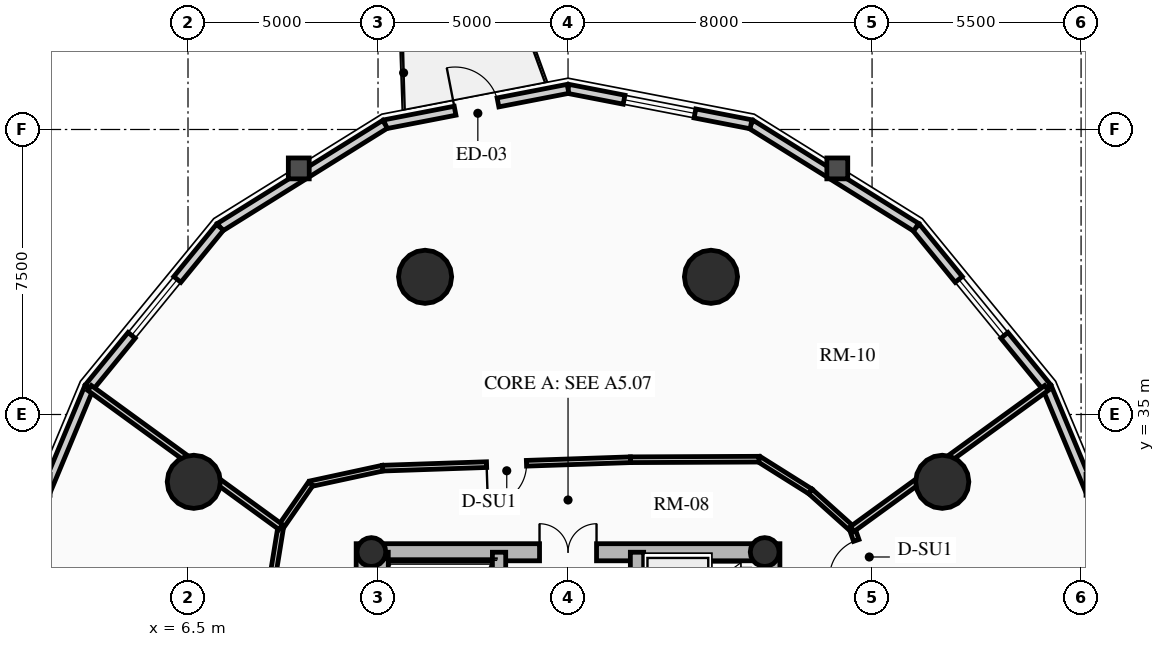
"""IFC4 building model, lengths in metres.
Left out: names, types, materials, properties, quantities, classifications, styles, units other than length and angle.
Written with IfcOpenShell. Run it as: python <this file> out.ifc"""

import sys

from ifc_helpers import new_model, si_unit, direction, frame, frame_2d, origin, origin_2d, place, context, subcontext, project, spatial, rectangle, circle, hollow_circle, extrude, source, transform, mapped, element, fill, save


model = new_model("IFC4")
c1 = context("Model", 3, precision=1e-05, world=origin(), true_north=direction((0.0, 1.0)))
c2 = subcontext(c1, "Body", "Model", "MODEL_VIEW")
j1 = project(units=[si_unit("LENGTHUNIT", "METRE"), si_unit("PLANEANGLEUNIT", "RADIAN")], contexts=[c1])
p1 = place(None, origin())
s1 = spatial("IfcSite", under=j1, at=p1, CompositionType="ELEMENT")
p2 = place(p1, origin())
s2 = spatial("IfcBuilding", under=s1, at=p2, CompositionType="ELEMENT")
p3 = place(p2, frame((0.0, 0.0, 122.53)))
s3 = spatial("IfcBuildingStorey", under=s2, at=p3, CompositionType="ELEMENT", Elevation=122.53)
for number, where, z_axis, x_axis in (
    (1, (11.15, 17.4, 0.0), (0.0, 0.0, 1.0), (0.0, 1.0, 0.0)),
    (2, (21.85, 17.4, 0.0), (0.0, 0.0, 1.0), (0.0, 1.0, 0.0)),
):
    element("IfcWall", number, at=place(p3, frame(where, z_axis=z_axis, x_axis=x_axis)), inside=s3, PredefinedType="SHEAR", context=c2, shape_type="SweptSolid", body=[
        extrude(rectangle(XDim=14.2, YDim=0.45, at=frame_2d((7.1, 0.0))), origin(), (0.0, 0.0, 1.0), 2.91),
    ])
p4 = place(p3, frame((11.15, 31.375, 0.0), z_axis=(0.0, 0.0, 1.0), x_axis=(1.0, 0.0, 0.0)))
e3 = element("IfcWall", 3, at=p4, inside=s3, PredefinedType="SHEAR", context=c2, shape_type="SweptSolid", body=[
    extrude(rectangle(XDim=10.7, YDim=0.45, at=frame_2d((5.35, 0.0))), origin(), (0.0, 0.0, 1.0), 2.91),
])
m1 = source(origin(), c2, "Body", "SweptSolid", [
    extrude(rectangle(XDim=1.5, YDim=2.02, at=frame_2d((0.75, 1.01))), frame((0.0, 0.235, 0.0), z_axis=(0.0, -1.0, 0.0), x_axis=(1.0, 0.0, 0.0)), (0.0, 0.0, 1.0), 0.47),
])
p5 = place(p4, frame((4.6, 0.0, 0.0)))
e4 = element("IfcOpeningElement", 4, at=p5, cuts=e3, PredefinedType="OPENING", context=c2, shape_type="MappedRepresentation", body=[
    mapped(m1, transform((0.0, 0.0, 0.0), x_axis=(1.0, 0.0, 0.0), y_axis=(0.0, 1.0, 0.0), z_axis=(0.0, 0.0, 1.0), scale=1.0)),
])
p6 = place(p3, frame((14.685, 17.625, 0.0), z_axis=(0.0, 0.0, 1.0), x_axis=(0.0, 1.0, 0.0)))
e5 = element("IfcWall", 5, at=p6, inside=s3, PredefinedType="SHEAR", context=c2, shape_type="SweptSolid", body=[
    extrude(rectangle(XDim=13.75, YDim=0.35, at=frame_2d((6.875, 0.0))), origin(), (0.0, 0.0, 1.0), 2.91),
])
m2 = source(origin(), c2, "Body", "SweptSolid", [
    extrude(rectangle(XDim=1.1, YDim=2.015, at=frame_2d((0.55, 1.007))), frame((0.0, 0.185, 0.0), z_axis=(0.0, -1.0, 0.0), x_axis=(1.0, 0.0, 0.0)), (0.0, 0.0, 1.0), 0.37),
])
p7 = place(p6, frame((4.875, 0.0, 0.0)))
e6 = element("IfcOpeningElement", 6, at=p7, cuts=e5, PredefinedType="OPENING", context=c2, shape_type="MappedRepresentation", body=[
    mapped(m2, transform((0.0, 0.0, 0.0), x_axis=(1.0, 0.0, 0.0), y_axis=(0.0, 1.0, 0.0), z_axis=(0.0, 0.0, 1.0), scale=1.0)),
])
m3 = source(origin(), c2, "Body", "SweptSolid", [
    extrude(rectangle(XDim=1.15, YDim=2.02, at=frame_2d((0.575, 1.01))), frame((0.0, 0.185, 0.0), z_axis=(0.0, -1.0, 0.0), x_axis=(1.0, 0.0, 0.0)), (0.0, 0.0, 1.0), 0.37),
])
p8 = place(p6, frame((7.295, 0.0, 0.0)))
e7 = element("IfcOpeningElement", 7, at=p8, cuts=e5, PredefinedType="OPENING", context=c2, shape_type="MappedRepresentation", body=[
    mapped(m3, transform((0.0, 0.0, 0.0), x_axis=(1.0, 0.0, 0.0), y_axis=(0.0, 1.0, 0.0), z_axis=(0.0, 0.0, 1.0), scale=1.0)),
])
p9 = place(p3, frame((18.315, 17.625, 0.0), z_axis=(0.0, 0.0, 1.0), x_axis=(0.0, 1.0, 0.0)))
e8 = element("IfcWall", 8, at=p9, inside=s3, PredefinedType="SHEAR", context=c2, shape_type="SweptSolid", body=[
    extrude(rectangle(XDim=13.75, YDim=0.35, at=frame_2d((6.875, 0.0))), origin(), (0.0, 0.0, 1.0), 2.91),
])
p10 = place(p9, frame((10.0, 0.0, 0.0)))
e9 = element("IfcOpeningElement", 9, at=p10, cuts=e8, PredefinedType="OPENING", context=c2, shape_type="MappedRepresentation", body=[
    mapped(m2, transform((0.0, 0.0, 0.0), x_axis=(1.0, 0.0, 0.0), y_axis=(0.0, 1.0, 0.0), z_axis=(0.0, 0.0, 1.0), scale=1.0)),
])
p11 = place(p9, frame((12.0, 0.0, 0.0)))
e10 = element("IfcOpeningElement", 10, at=p11, cuts=e8, PredefinedType="OPENING", context=c2, shape_type="MappedRepresentation", body=[
    mapped(m2, transform((0.0, 0.0, 0.0), x_axis=(1.0, 0.0, 0.0), y_axis=(0.0, 1.0, 0.0), z_axis=(0.0, 0.0, 1.0), scale=1.0)),
])
p12 = place(p9, frame((5.305, 0.0, 0.0)))
e11 = element("IfcOpeningElement", 11, at=p12, cuts=e8, PredefinedType="OPENING", context=c2, shape_type="MappedRepresentation", body=[
    mapped(m3, transform((0.0, 0.0, 0.0), x_axis=(1.0, 0.0, 0.0), y_axis=(0.0, 1.0, 0.0), z_axis=(0.0, 0.0, 1.0), scale=1.0)),
])
p13 = place(p3, frame((11.595, 24.655, 0.0), z_axis=(0.0, 0.0, 1.0), x_axis=(0.0, 1.0, 0.0)))
e12 = element("IfcWall", 12, at=p13, inside=s3, PredefinedType="SHEAR", context=c2, shape_type="SweptSolid", body=[
    extrude(rectangle(XDim=6.72, YDim=0.35, at=frame_2d((3.36, 0.0))), origin(), (0.0, 0.0, 1.0), 2.91),
])
for number, where, z_axis, x_axis in (
    (13, (11.325, 31.38, 0.0), (0.0, 0.0, 1.0), (1.0, 0.0, 0.0)),
    (14, (21.675, 31.38, 0.0), (0.0, 0.0, 1.0), (1.0, 0.0, 0.0)),
):
    element("IfcColumn", number, at=place(p3, frame(where, z_axis=z_axis, x_axis=x_axis)), inside=s3, PredefinedType="COLUMN", context=c2, shape_type="SweptSolid", body=[
        extrude(hollow_circle(Radius=0.38, WallThickness=0.032, at=origin_2d()), origin(), (0.0, 0.0, 1.0), 2.91),
    ])
for number, where, z_axis, x_axis in (
    (15, (26.347, 33.229, 0.0), (0.0, 0.0, 1.0), (1.0, 0.0, 0.0)),
    (16, (20.261, 38.623, 0.0), (0.0, 0.0, 1.0), (1.0, 0.0, 0.0)),
    (17, (12.739, 38.623, 0.0), (0.0, 0.0, 1.0), (1.0, 0.0, 0.0)),
    (18, (6.653, 33.229, 0.0), (0.0, 0.0, 1.0), (1.0, 0.0, 0.0)),
):
    element("IfcColumn", number, at=place(p3, frame(where, z_axis=z_axis, x_axis=x_axis)), inside=s3, PredefinedType="USERDEFINED", context=c2, shape_type="SweptSolid", body=[
        extrude(circle(Radius=0.7, at=origin_2d()), origin(), (0.0, 0.0, 1.0), 2.91),
    ])
p14 = place(p3, frame((29.105, 35.709, 0.0), z_axis=(0.0, 0.0, 1.0), x_axis=(0.384344417632, -0.923189779317, 0.0)))
e19 = element("IfcWall", 19, at=p14, inside=s3, PredefinedType="SOLIDWALL", context=c2, shape_type="SweptSolid", body=[
    extrude(rectangle(XDim=5.758, YDim=0.24, at=frame_2d((2.879, 0.0))), origin(), (0.0, 0.0, 1.0), 2.139),
])
p15 = place(p3, frame((25.658, 39.928, 0.0), z_axis=(0.0, 0.0, 1.0), x_axis=(0.632700781152, -0.77439635945, 0.0)))
e20 = element("IfcWall", 20, at=p15, inside=s3, PredefinedType="SOLIDWALL", context=c2, shape_type="SweptSolid", body=[
    extrude(rectangle(XDim=5.448, YDim=0.24, at=frame_2d((2.724, 0.0))), origin(), (0.0, 0.0, 1.0), 2.139),
])
m4 = source(origin(), c2, "Body", "SweptSolid", [
    extrude(rectangle(XDim=1.9, YDim=1.35, at=frame_2d((0.95, 0.675))), frame((0.0, 0.13, 0.0), z_axis=(0.0, -1.0, 0.0), x_axis=(1.0, 0.0, 0.0)), (0.0, 0.0, 1.0), 0.26),
])
p16 = place(p15, frame((1.774, 0.0, 0.65)))
e21 = element("IfcOpeningElement", 21, at=p16, cuts=e20, PredefinedType="OPENING", context=c2, shape_type="MappedRepresentation", body=[
    mapped(m4, transform((0.0, 0.0, 0.0), x_axis=(1.0, 0.0, 0.0), y_axis=(0.0, 1.0, 0.0), z_axis=(0.0, 0.0, 1.0), scale=1.0)),
])
p17 = place(p3, frame((21.315, 42.637, 0.0), z_axis=(0.0, 0.0, 1.0), x_axis=(0.848520380187, -0.529162701263, 0.0)))
e22 = element("IfcWall", 22, at=p17, inside=s3, PredefinedType="SOLIDWALL", context=c2, shape_type="SweptSolid", body=[
    extrude(rectangle(XDim=5.119, YDim=0.24, at=frame_2d((2.56, 0.0))), origin(), (0.0, 0.0, 1.0), 2.139),
])
p18 = place(p3, frame((16.5, 43.57, 0.0), z_axis=(0.0, 0.0, 1.0), x_axis=(0.981723785992, -0.190311344954, 0.0)))
e23 = element("IfcWall", 23, at=p18, inside=s3, PredefinedType="SOLIDWALL", context=c2, shape_type="SweptSolid", body=[
    extrude(rectangle(XDim=4.904, YDim=0.24, at=frame_2d((2.452, 0.0))), origin(), (0.0, 0.0, 1.0), 2.139),
])
p19 = place(p18, frame((1.502, 0.0, 0.65)))
e24 = element("IfcOpeningElement", 24, at=p19, cuts=e23, PredefinedType="OPENING", context=c2, shape_type="MappedRepresentation", body=[
    mapped(m4, transform((0.0, 0.0, 0.0), x_axis=(1.0, 0.0, 0.0), y_axis=(0.0, 1.0, 0.0), z_axis=(0.0, 0.0, 1.0), scale=1.0)),
])
p20 = place(p3, frame((11.685, 42.637, 0.0), z_axis=(0.0, 0.0, 1.0), x_axis=(0.981723785992, 0.190311344954, 0.0)))
e25 = element("IfcWall", 25, at=p20, inside=s3, PredefinedType="SOLIDWALL", context=c2, shape_type="SweptSolid", body=[
    extrude(rectangle(XDim=4.904, YDim=0.24, at=frame_2d((2.452, 0.0))), origin(), (0.0, 0.0, 1.0), 2.139),
])
m5 = source(origin(), c2, "Body", "SweptSolid", [
    extrude(rectangle(XDim=1.15, YDim=2.005, at=frame_2d((0.575, 1.002))), frame((0.0, 0.13, 0.0), z_axis=(0.0, -1.0, 0.0), x_axis=(1.0, 0.0, 0.0)), (0.0, 0.0, 1.0), 0.26),
])
p21 = place(p20, frame((1.877, 0.0, 0.0)))
e26 = element("IfcOpeningElement", 26, at=p21, cuts=e25, PredefinedType="OPENING", context=c2, shape_type="MappedRepresentation", body=[
    mapped(m5, transform((0.0, 0.0, 0.0), x_axis=(1.0, 0.0, 0.0), y_axis=(0.0, 1.0, 0.0), z_axis=(0.0, 0.0, 1.0), scale=1.0)),
])
p22 = place(p3, frame((7.342, 39.928, 0.0), z_axis=(0.0, 0.0, 1.0), x_axis=(0.848520380187, 0.529162701263, 0.0)))
e27 = element("IfcWall", 27, at=p22, inside=s3, PredefinedType="SOLIDWALL", context=c2, shape_type="SweptSolid", body=[
    extrude(rectangle(XDim=5.119, YDim=0.24, at=frame_2d((2.56, 0.0))), origin(), (0.0, 0.0, 1.0), 2.139),
])
p23 = place(p3, frame((3.895, 35.709, 0.0), z_axis=(0.0, 0.0, 1.0), x_axis=(0.632700781152, 0.77439635945, 0.0)))
e28 = element("IfcWall", 28, at=p23, inside=s3, PredefinedType="SOLIDWALL", context=c2, shape_type="SweptSolid", body=[
    extrude(rectangle(XDim=5.448, YDim=0.24, at=frame_2d((2.724, 0.0))), origin(), (0.0, 0.0, 1.0), 2.139),
])
p24 = place(p23, frame((1.774, 0.0, 0.65)))
e29 = element("IfcOpeningElement", 29, at=p24, cuts=e28, PredefinedType="OPENING", context=c2, shape_type="MappedRepresentation", body=[
    mapped(m4, transform((0.0, 0.0, 0.0), x_axis=(1.0, 0.0, 0.0), y_axis=(0.0, 1.0, 0.0), z_axis=(0.0, 0.0, 1.0), scale=1.0)),
])
p25 = place(p3, frame((1.682, 30.393, 0.0), z_axis=(0.0, 0.0, 1.0), x_axis=(0.384344417632, 0.923189779317, 0.0)))
e30 = element("IfcWall", 30, at=p25, inside=s3, PredefinedType="SOLIDWALL", context=c2, shape_type="SweptSolid", body=[
    extrude(rectangle(XDim=5.758, YDim=0.24, at=frame_2d((2.879, 0.0))), origin(), (0.0, 0.0, 1.0), 2.139),
])
p26 = place(p3, frame((24.469, 30.582, 0.0), z_axis=(0.0, 0.0, 1.0), x_axis=(-0.328902536986, 0.944363871166, 0.0)))
e31 = element("IfcWall", 31, at=p26, inside=s3, PredefinedType="PARTITIONING", context=c2, shape_type="SweptSolid", body=[
    extrude(rectangle(XDim=1.488, YDim=0.15, at=frame_2d((0.744, 0.0))), origin(), (0.0, 0.0, 1.0), 2.185),
])
m6 = source(origin(), c2, "Body", "SweptSolid", [
    extrude(rectangle(XDim=1.05, YDim=2.015, at=frame_2d((0.525, 1.007))), frame((0.0, 0.085, 0.0), z_axis=(0.0, -1.0, 0.0), x_axis=(1.0, 0.0, 0.0)), (0.0, 0.0, 1.0), 0.17),
])
p27 = place(p26, frame((0.12, 0.0, 0.0)))
e32 = element("IfcOpeningElement", 32, at=p27, cuts=e31, PredefinedType="OPENING", context=c2, shape_type="MappedRepresentation", body=[
    mapped(m6, transform((0.0, 0.0, 0.0), x_axis=(1.0, 0.0, 0.0), y_axis=(0.0, 1.0, 0.0), z_axis=(0.0, 0.0, 1.0), scale=1.0)),
])
p28 = place(p3, frame((23.98, 31.987, 0.0), z_axis=(0.0, 0.0, 1.0), x_axis=(-0.744317922268, 0.667825449193, 0.0)))
e33 = element("IfcWall", 33, at=p28, inside=s3, PredefinedType="PARTITIONING", context=c2, shape_type="SweptSolid", body=[
    extrude(rectangle(XDim=1.481, YDim=0.15, at=frame_2d((0.74, 0.0))), origin(), (0.0, 0.0, 1.0), 2.185),
])
p29 = place(p3, frame((22.877, 32.976, 0.0), z_axis=(0.0, 0.0, 1.0), x_axis=(-0.846723232687, 0.532033614754, 0.0)))
e34 = element("IfcWall", 34, at=p29, inside=s3, PredefinedType="PARTITIONING", context=c2, shape_type="SweptSolid", body=[
    extrude(rectangle(XDim=1.595, YDim=0.15, at=frame_2d((0.797, 0.0))), origin(), (0.0, 0.0, 1.0), 2.185),
])
p30 = place(p3, frame((21.527, 33.824, 0.0), z_axis=(0.0, 0.0, 1.0), x_axis=(-0.999990631344, -0.00432865146, 0.0)))
e35 = element("IfcWall", 35, at=p30, inside=s3, PredefinedType="PARTITIONING", context=c2, shape_type="SweptSolid", body=[
    extrude(rectangle(XDim=3.384, YDim=0.15, at=frame_2d((1.692, 0.0))), origin(), (0.0, 0.0, 1.0), 2.185),
])
p31 = place(p3, frame((18.143, 33.81, 0.0), z_axis=(0.0, 0.0, 1.0), x_axis=(-0.999423023908, -0.033964971394, 0.0)))
e36 = element("IfcWall", 36, at=p31, inside=s3, PredefinedType="PARTITIONING", context=c2, shape_type="SweptSolid", body=[
    extrude(rectangle(XDim=6.527, YDim=0.15, at=frame_2d((3.263, 0.0))), origin(), (0.0, 0.0, 1.0), 2.185),
])
p32 = place(p31, frame((2.738, 0.0, 0.0)))
e37 = element("IfcOpeningElement", 37, at=p32, cuts=e36, PredefinedType="OPENING", context=c2, shape_type="MappedRepresentation", body=[
    mapped(m6, transform((0.0, 0.0, 0.0), x_axis=(1.0, 0.0, 0.0), y_axis=(0.0, 1.0, 0.0), z_axis=(0.0, 0.0, 1.0), scale=1.0)),
])
p33 = place(p3, frame((11.62, 33.588, 0.0), z_axis=(0.0, 0.0, 1.0), x_axis=(-0.977392314559, -0.211433827571, 0.0)))
e38 = element("IfcWall", 38, at=p33, inside=s3, PredefinedType="PARTITIONING", context=c2, shape_type="SweptSolid", body=[
    extrude(rectangle(XDim=1.934, YDim=0.15, at=frame_2d((0.967, 0.0))), origin(), (0.0, 0.0, 1.0), 2.185),
])
p34 = place(p3, frame((9.729, 33.179, 0.0), z_axis=(0.0, 0.0, 1.0), x_axis=(-0.569155068352, -0.822230203878, 0.0)))
e39 = element("IfcWall", 39, at=p34, inside=s3, PredefinedType="PARTITIONING", context=c2, shape_type="SweptSolid", body=[
    extrude(rectangle(XDim=1.387, YDim=0.15, at=frame_2d((0.694, 0.0))), origin(), (0.0, 0.0, 1.0), 2.185),
])
p35 = place(p3, frame((8.94, 32.038, 0.0), z_axis=(0.0, 0.0, 1.0), x_axis=(-0.159917336462, -0.987130409571, 0.0)))
e40 = element("IfcWall", 40, at=p35, inside=s3, PredefinedType="PARTITIONING", context=c2, shape_type="SweptSolid", body=[
    extrude(rectangle(XDim=1.547, YDim=0.15, at=frame_2d((0.773, 0.0))), origin(), (0.0, 0.0, 1.0), 2.185),
])
p36 = place(p3, frame((23.98, 31.987, 0.0), z_axis=(0.0, 0.0, 1.0), x_axis=(0.809128798462, 0.587631336383, 0.0)))
e41 = element("IfcWall", 41, at=p36, inside=s3, PredefinedType="PARTITIONING", context=c2, shape_type="SweptSolid", body=[
    extrude(rectangle(XDim=6.315, YDim=0.16, at=frame_2d((3.157, 0.0))), origin(), (0.0, 0.0, 1.0), 2.139),
])
p37 = place(p3, frame((8.94, 32.038, 0.0), z_axis=(0.0, 0.0, 1.0), x_axis=(-0.808625730058, 0.588323404844, 0.0)))
e42 = element("IfcWall", 42, at=p37, inside=s3, PredefinedType="PARTITIONING", context=c2, shape_type="SweptSolid", body=[
    extrude(rectangle(XDim=6.219, YDim=0.16, at=frame_2d((3.11, 0.0))), origin(), (0.0, 0.0, 1.0), 2.139),
])
m7 = source(origin(), c2, "Body", "SweptSolid", [
    extrude(rectangle(XDim=1.9, YDim=1.35, at=frame_2d((0.95, 0.675))), frame((0.0, 0.03, 0.0), z_axis=(0.0, -1.0, 0.0), x_axis=(1.0, 0.0, 0.0)), (0.0, 0.0, 1.0), 0.06),
])
p38 = place(p16, origin())
e43 = element("IfcWindow", 43, at=p38, inside=s3, PartitioningType="DOUBLE_PANEL_VERTICAL", PredefinedType="WINDOW", context=c2, shape_type="MappedRepresentation", body=[
    mapped(m7, transform((0.0, 0.0, 0.0), x_axis=(1.0, 0.0, 0.0), y_axis=(0.0, 1.0, 0.0), z_axis=(0.0, 0.0, 1.0), scale=1.0)),
])
fill(e21, e43)
p39 = place(p19, origin())
e44 = element("IfcWindow", 44, at=p39, inside=s3, PartitioningType="DOUBLE_PANEL_VERTICAL", PredefinedType="WINDOW", context=c2, shape_type="MappedRepresentation", body=[
    mapped(m7, transform((0.0, 0.0, 0.0), x_axis=(1.0, 0.0, 0.0), y_axis=(0.0, 1.0, 0.0), z_axis=(0.0, 0.0, 1.0), scale=1.0)),
])
fill(e24, e44)
m8 = source(origin(), c2, "Body", "SweptSolid", [
    extrude(rectangle(XDim=1.15, YDim=2.005, at=frame_2d((0.575, 1.002))), frame((0.0, 0.025, 0.0), z_axis=(0.0, -1.0, 0.0), x_axis=(1.0, 0.0, 0.0)), (0.0, 0.0, 1.0), 0.05),
])
p40 = place(p21, origin())
e45 = element("IfcDoor", 45, at=p40, inside=s3, OperationType="SINGLE_SWING_LEFT", PredefinedType="DOOR", context=c2, shape_type="MappedRepresentation", body=[
    mapped(m8, transform((0.0, 0.0, 0.0), x_axis=(1.0, 0.0, 0.0), y_axis=(0.0, 1.0, 0.0), z_axis=(0.0, 0.0, 1.0), scale=1.0)),
])
fill(e26, e45)
p41 = place(p24, origin())
e46 = element("IfcWindow", 46, at=p41, inside=s3, PartitioningType="DOUBLE_PANEL_VERTICAL", PredefinedType="WINDOW", context=c2, shape_type="MappedRepresentation", body=[
    mapped(m7, transform((0.0, 0.0, 0.0), x_axis=(1.0, 0.0, 0.0), y_axis=(0.0, 1.0, 0.0), z_axis=(0.0, 0.0, 1.0), scale=1.0)),
])
fill(e29, e46)
m9 = source(origin(), c2, "Body", "SweptSolid", [
    extrude(rectangle(XDim=1.5, YDim=2.02, at=frame_2d((0.75, 1.01))), frame((0.0, 0.025, 0.0), z_axis=(0.0, -1.0, 0.0), x_axis=(1.0, 0.0, 0.0)), (0.0, 0.0, 1.0), 0.05),
])
p42 = place(p5, origin())
e47 = element("IfcDoor", 47, at=p42, inside=s3, OperationType="DOUBLE_DOOR_SINGLE_SWING", PredefinedType="DOOR", context=c2, shape_type="MappedRepresentation", body=[
    mapped(m9, transform((0.0, 0.0, 0.0), x_axis=(1.0, 0.0, 0.0), y_axis=(0.0, 1.0, 0.0), z_axis=(0.0, 0.0, 1.0), scale=1.0)),
])
fill(e4, e47)
m10 = source(origin(), c2, "Body", "SweptSolid", [
    extrude(rectangle(XDim=1.05, YDim=2.015, at=frame_2d((0.525, 1.007))), frame((0.0, 0.025, 0.0), z_axis=(0.0, -1.0, 0.0), x_axis=(1.0, 0.0, 0.0)), (0.0, 0.0, 1.0), 0.05),
])
p43 = place(p27, origin())
e48 = element("IfcDoor", 48, at=p43, inside=s3, OperationType="SINGLE_SWING_LEFT", PredefinedType="DOOR", context=c2, shape_type="MappedRepresentation", body=[
    mapped(m10, transform((0.0, 0.0, 0.0), x_axis=(1.0, 0.0, 0.0), y_axis=(0.0, 1.0, 0.0), z_axis=(0.0, 0.0, 1.0), scale=1.0)),
])
fill(e32, e48)
p44 = place(p32, origin())
e49 = element("IfcDoor", 49, at=p44, inside=s3, OperationType="SINGLE_SWING_RIGHT", PredefinedType="DOOR", context=c2, shape_type="MappedRepresentation", body=[
    mapped(m10, transform((0.0, 0.0, 0.0), x_axis=(1.0, 0.0, 0.0), y_axis=(0.0, 1.0, 0.0), z_axis=(0.0, 0.0, 1.0), scale=1.0)),
])
fill(e37, e49)
save(model, sys.argv[1])
